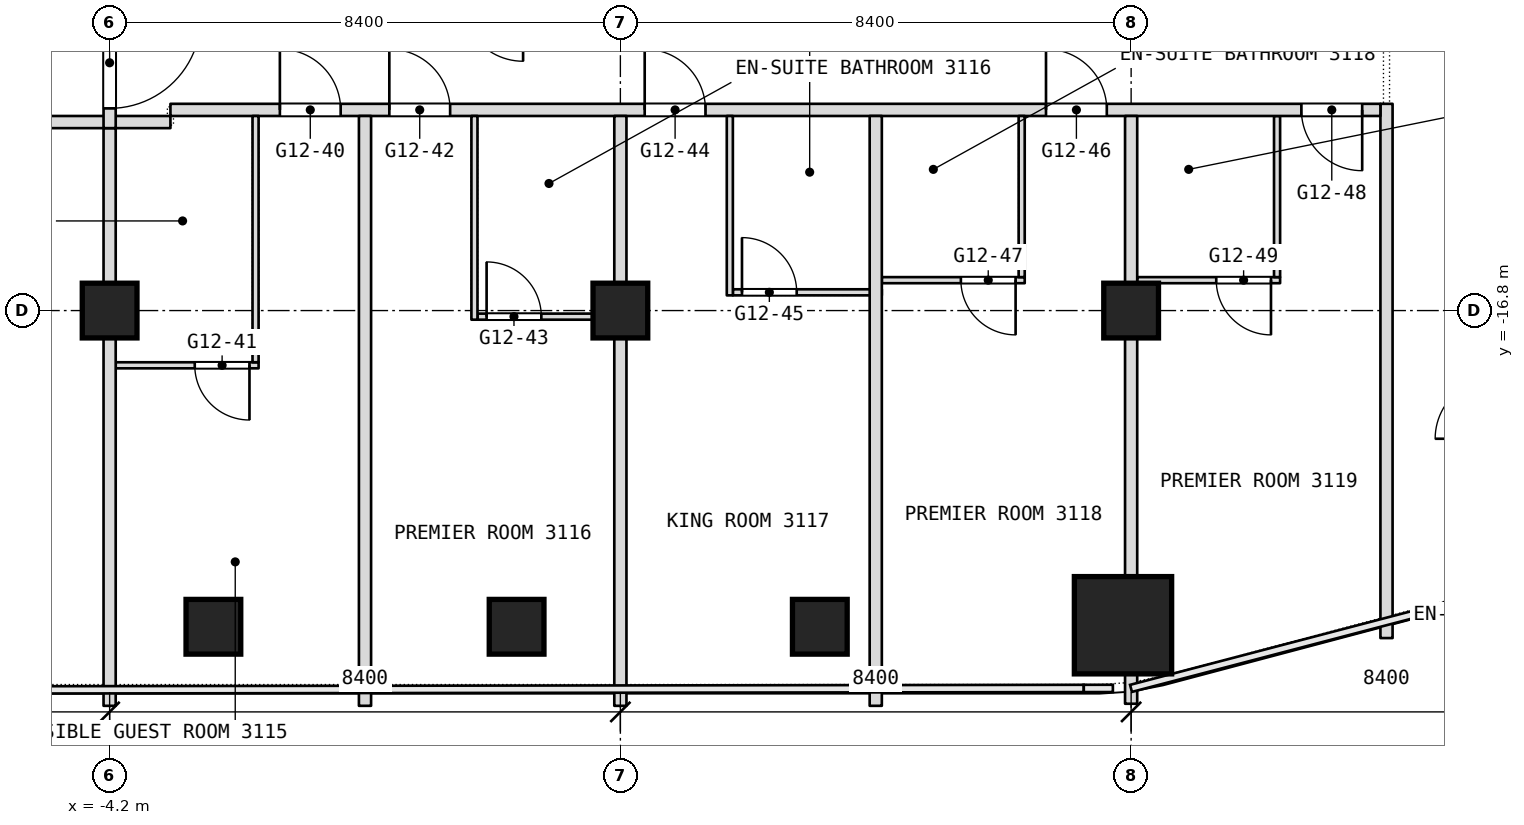
"""IFC4 building model, lengths in metres.
Left out: names, types, materials, properties, quantities, classifications, styles, units other than length and angle.
Written with IfcOpenShell. Run it as: python <this file> out.ifc"""

import sys

from ifc_helpers import new_model, si_unit, direction, frame, frame_2d, origin, origin_2d, place, context, subcontext, project, spatial, rectangle, extrude, element, fill, save


model = new_model("IFC4")
c1 = context("Model", 3, precision=1e-05, world=origin(), true_north=direction((0.0, 1.0)))
c2 = subcontext(c1, "Body", "Model", "MODEL_VIEW")
j1 = project(units=[si_unit("LENGTHUNIT", "METRE"), si_unit("PLANEANGLEUNIT", "RADIAN")], contexts=[c1])
p1 = place(None, origin())
s1 = spatial("IfcSite", under=j1, at=p1, CompositionType="ELEMENT")
p2 = place(p1, origin())
s2 = spatial("IfcBuilding", under=s1, at=p2, CompositionType="ELEMENT")
p3 = place(p2, frame((0.0, 0.0, 137.3)))
s3 = spatial("IfcBuildingStorey", under=s2, at=p3, CompositionType="ELEMENT", Elevation=137.3)
p4 = place(p3, frame((12.466, -21.975, 0.0), z_axis=(0.0, 0.0, 1.0), x_axis=(1.0, 0.0, 0.0)))
e1 = element("IfcColumn", 1, at=p4, inside=s3, PredefinedType="COLUMN", context=c2, shape_type="SweptSolid", body=[
    extrude(rectangle(XDim=1.6, YDim=1.6, at=origin_2d()), origin(), (0.0, 0.0, 1.0), 3.6),
])
for number, where, z_axis, x_axis in (
    (2, (-4.2, -16.8, 0.0), (0.0, 0.0, 1.0), (1.0, 0.0, 0.0)),
    (3, (4.2, -16.8, 0.0), (0.0, 0.0, 1.0), (1.0, 0.0, 0.0)),
    (4, (12.6, -16.8, 0.0), (0.0, 0.0, 1.0), (1.0, 0.0, 0.0)),
    (5, (7.48, -22.0, 0.0), (0.0, 0.0, 1.0), (1.0, 0.0, 0.0)),
    (6, (2.493, -22.0, 0.0), (0.0, 0.0, 1.0), (1.0, 0.0, 0.0)),
    (7, (-2.493, -22.0, 0.0), (0.0, 0.0, 1.0), (1.0, 0.0, 0.0)),
):
    element("IfcColumn", number, at=place(p3, frame(where, z_axis=z_axis, x_axis=x_axis)), inside=s3, PredefinedType="COLUMN", context=c2, shape_type="SweptSolid", body=[
        extrude(rectangle(XDim=0.9, YDim=0.9, at=origin_2d()), origin(), (0.0, 0.0, 1.0), 3.6),
    ])
p5 = place(p3, frame((-4.1, -17.7, 0.0), z_axis=(0.0, 0.0, 1.0), x_axis=(1.0, 0.0, 0.0)))
e8 = element("IfcWall", 8, at=p5, inside=s3, PredefinedType="PARTITIONING", context=c2, shape_type="SweptSolid", body=[
    extrude(rectangle(XDim=2.35, YDim=0.1, at=frame_2d((1.175, 0.0))), origin(), (0.0, 0.0, 1.0), 3.34),
])
p6 = place(p5, frame((1.3, 0.0, 0.0)))
e9 = element("IfcOpeningElement", 9, at=p6, cuts=e8, PredefinedType="OPENING", context=c2, shape_type="SweptSolid", body=[
    extrude(rectangle(XDim=0.9, YDim=2.1, at=frame_2d((0.45, 1.05))), frame((0.0, 0.05, 0.0), z_axis=(0.0, -1.0, 0.0), x_axis=(1.0, 0.0, 0.0)), (0.0, 0.0, 1.0), 0.1),
])
p7 = place(p3, frame((1.85, -16.9, 0.0), z_axis=(0.0, 0.0, 1.0), x_axis=(1.0, 0.0, 0.0)))
e10 = element("IfcWall", 10, at=p7, inside=s3, PredefinedType="PARTITIONING", context=c2, shape_type="SweptSolid", body=[
    extrude(rectangle(XDim=2.45, YDim=0.1, at=frame_2d((1.225, 0.0))), origin(), (0.0, 0.0, 1.0), 2.89),
])
p8 = place(p7, frame((0.15, 0.0, 0.0)))
e11 = element("IfcOpeningElement", 11, at=p8, cuts=e10, PredefinedType="OPENING", context=c2, shape_type="SweptSolid", body=[
    extrude(rectangle(XDim=0.9, YDim=2.1, at=frame_2d((0.45, 1.05))), frame((0.0, 0.05, 0.0), z_axis=(0.0, -1.0, 0.0), x_axis=(1.0, 0.0, 0.0)), (0.0, 0.0, 1.0), 0.1),
])
p9 = place(p3, frame((16.8, -22.186, 0.0), z_axis=(0.0, 0.0, 1.0), x_axis=(0.0, 1.0, 0.0)))
e12 = element("IfcWall", 12, at=p9, inside=s3, PredefinedType="PARTITIONING", context=c2, shape_type="SweptSolid", body=[
    extrude(rectangle(XDim=8.786, YDim=0.2, at=frame_2d((4.393, 0.0))), origin(), (0.0, 0.0, 1.0), 3.34),
])
p10 = place(p3, frame((6.05, -16.5, 0.0), z_axis=(0.0, 0.0, 1.0), x_axis=(1.0, 0.0, 0.0)))
e13 = element("IfcWall", 13, at=p10, inside=s3, PredefinedType="PARTITIONING", context=c2, shape_type="SweptSolid", body=[
    extrude(rectangle(XDim=2.45, YDim=0.1, at=frame_2d((1.225, 0.0))), origin(), (0.0, 0.0, 1.0), 3.34),
])
p11 = place(p10, frame((0.15, 0.0, 0.0)))
e14 = element("IfcOpeningElement", 14, at=p11, cuts=e13, PredefinedType="OPENING", context=c2, shape_type="SweptSolid", body=[
    extrude(rectangle(XDim=0.9, YDim=2.1, at=frame_2d((0.45, 1.05))), frame((0.0, 0.05, 0.0), z_axis=(0.0, -1.0, 0.0), x_axis=(1.0, 0.0, 0.0)), (0.0, 0.0, 1.0), 0.1),
])
p12 = place(p3, frame((8.5, -16.3, 0.0), z_axis=(0.0, 0.0, 1.0), x_axis=(1.0, 0.0, 0.0)))
e15 = element("IfcWall", 15, at=p12, inside=s3, PredefinedType="PARTITIONING", context=c2, shape_type="SweptSolid", body=[
    extrude(rectangle(XDim=2.35, YDim=0.1, at=frame_2d((1.175, 0.0))), origin(), (0.0, 0.0, 1.0), 3.34),
])
p13 = place(p12, frame((1.3, 0.0, 0.0)))
e16 = element("IfcOpeningElement", 16, at=p13, cuts=e15, PredefinedType="OPENING", context=c2, shape_type="SweptSolid", body=[
    extrude(rectangle(XDim=0.9, YDim=2.1, at=frame_2d((0.45, 1.05))), frame((0.0, 0.05, 0.0), z_axis=(0.0, -1.0, 0.0), x_axis=(1.0, 0.0, 0.0)), (0.0, 0.0, 1.0), 0.1),
])
p14 = place(p3, frame((12.7, -16.3, 0.0), z_axis=(0.0, 0.0, 1.0), x_axis=(1.0, 0.0, 0.0)))
e17 = element("IfcWall", 17, at=p14, inside=s3, PredefinedType="PARTITIONING", context=c2, shape_type="SweptSolid", body=[
    extrude(rectangle(XDim=2.35, YDim=0.1, at=frame_2d((1.175, 0.0))), origin(), (0.0, 0.0, 1.0), 3.34),
])
p15 = place(p14, frame((1.3, 0.0, 0.0)))
e18 = element("IfcOpeningElement", 18, at=p15, cuts=e17, PredefinedType="OPENING", context=c2, shape_type="SweptSolid", body=[
    extrude(rectangle(XDim=0.9, YDim=2.1, at=frame_2d((0.45, 1.05))), frame((0.0, 0.05, 0.0), z_axis=(0.0, -1.0, 0.0), x_axis=(1.0, 0.0, 0.0)), (0.0, 0.0, 1.0), 0.1),
])
p16 = place(p3, frame((15.0, -16.25, 0.0), z_axis=(0.0, 0.0, 1.0), x_axis=(0.0, 1.0, 0.0)))
e19 = element("IfcWall", 19, at=p16, inside=s3, PredefinedType="PARTITIONING", context=c2, shape_type="SweptSolid", body=[
    extrude(rectangle(XDim=2.65, YDim=0.1, at=frame_2d((1.325, 0.0))), origin(), (0.0, 0.0, 1.0), 3.34),
])
p17 = place(p3, frame((-12.4, -13.7, 0.0), z_axis=(0.0, 0.0, 1.0), x_axis=(1.0, 0.0, 0.0)))
e20 = element("IfcWall", 20, at=p17, inside=s3, PredefinedType="PARTITIONING", context=c2, shape_type="SweptSolid", body=[
    extrude(rectangle(XDim=9.2, YDim=0.2, at=frame_2d((4.6, 0.0))), origin(), (0.0, 0.0, 1.0), 3.34),
])
p18 = place(p17, frame((3.1, 0.0, 0.0)))
e21 = element("IfcOpeningElement", 21, at=p18, cuts=e20, PredefinedType="OPENING", context=c2, shape_type="SweptSolid", body=[
    extrude(rectangle(XDim=1.8, YDim=2.1, at=frame_2d((0.9, 1.05))), frame((0.0, 0.1, 0.0), z_axis=(0.0, -1.0, 0.0), x_axis=(1.0, 0.0, 0.0)), (0.0, 0.0, 1.0), 0.2),
])
p19 = place(p3, frame((-3.2, -13.5, 0.0), z_axis=(0.0, 0.0, 1.0), x_axis=(1.0, 0.0, 0.0)))
e22 = element("IfcWall", 22, at=p19, inside=s3, PredefinedType="PARTITIONING", context=c2, shape_type="SweptSolid", body=[
    extrude(rectangle(XDim=19.9, YDim=0.2, at=frame_2d((9.95, 0.0))), origin(), (0.0, 0.0, 1.0), 3.34),
])
p20 = place(p19, frame((1.8, 0.0, 0.0)))
e23 = element("IfcOpeningElement", 23, at=p20, cuts=e22, PredefinedType="OPENING", context=c2, shape_type="SweptSolid", body=[
    extrude(rectangle(XDim=1.0, YDim=2.1, at=frame_2d((0.5, 1.05))), frame((0.0, 0.1, 0.0), z_axis=(0.0, -1.0, 0.0), x_axis=(1.0, 0.0, 0.0)), (0.0, 0.0, 1.0), 0.2),
])
p21 = place(p19, frame((3.6, 0.0, 0.0)))
e24 = element("IfcOpeningElement", 24, at=p21, cuts=e22, PredefinedType="OPENING", context=c2, shape_type="SweptSolid", body=[
    extrude(rectangle(XDim=1.0, YDim=2.1, at=frame_2d((0.5, 1.05))), frame((0.0, 0.1, 0.0), z_axis=(0.0, -1.0, 0.0), x_axis=(1.0, 0.0, 0.0)), (0.0, 0.0, 1.0), 0.2),
])
p22 = place(p19, frame((7.8, 0.0, 0.0)))
e25 = element("IfcOpeningElement", 25, at=p22, cuts=e22, PredefinedType="OPENING", context=c2, shape_type="SweptSolid", body=[
    extrude(rectangle(XDim=1.0, YDim=2.1, at=frame_2d((0.5, 1.05))), frame((0.0, 0.1, 0.0), z_axis=(0.0, -1.0, 0.0), x_axis=(1.0, 0.0, 0.0)), (0.0, 0.0, 1.0), 0.2),
])
p23 = place(p19, frame((14.4, 0.0, 0.0)))
e26 = element("IfcOpeningElement", 26, at=p23, cuts=e22, PredefinedType="OPENING", context=c2, shape_type="SweptSolid", body=[
    extrude(rectangle(XDim=1.0, YDim=2.1, at=frame_2d((0.5, 1.05))), frame((0.0, 0.1, 0.0), z_axis=(0.0, -1.0, 0.0), x_axis=(1.0, 0.0, 0.0)), (0.0, 0.0, 1.0), 0.2),
])
p24 = place(p19, frame((18.6, 0.0, 0.0)))
e27 = element("IfcOpeningElement", 27, at=p24, cuts=e22, PredefinedType="OPENING", context=c2, shape_type="SweptSolid", body=[
    extrude(rectangle(XDim=1.0, YDim=2.1, at=frame_2d((0.5, 1.05))), frame((0.0, 0.1, 0.0), z_axis=(0.0, -1.0, 0.0), x_axis=(1.0, 0.0, 0.0)), (0.0, 0.0, 1.0), 0.2),
])
p25 = place(p3, frame((12.6, -23.266, 0.0), z_axis=(0.0, 0.0, 1.0), x_axis=(0.0, 1.0, 0.0)))
e28 = element("IfcWall", 28, at=p25, inside=s3, PredefinedType="PARTITIONING", context=c2, shape_type="SweptSolid", body=[
    extrude(rectangle(XDim=0.491, YDim=0.2, at=frame_2d((0.246, 0.0))), origin(), (0.0, 0.0, 1.0), 3.34),
])
p26 = place(p3, frame((12.6, -21.175, 0.0), z_axis=(0.0, 0.0, 1.0), x_axis=(0.0, 1.0, 0.0)))
e29 = element("IfcWall", 29, at=p26, inside=s3, PredefinedType="PARTITIONING", context=c2, shape_type="SweptSolid", body=[
    extrude(rectangle(XDim=7.575, YDim=0.2, at=frame_2d((3.788, 0.0))), origin(), (0.0, 0.0, 1.0), 3.34),
])
p27 = place(p3, frame((10.8, -16.25, 0.0), z_axis=(0.0, 0.0, 1.0), x_axis=(0.0, 1.0, 0.0)))
e30 = element("IfcWall", 30, at=p27, inside=s3, PredefinedType="PARTITIONING", context=c2, shape_type="SweptSolid", body=[
    extrude(rectangle(XDim=2.65, YDim=0.1, at=frame_2d((1.325, 0.0))), origin(), (0.0, 0.0, 1.0), 3.34),
])
p28 = place(p3, frame((8.4, -23.3, 0.0), z_axis=(0.0, 0.0, 1.0), x_axis=(0.0, 1.0, 0.0)))
e31 = element("IfcWall", 31, at=p28, inside=s3, PredefinedType="PARTITIONING", context=c2, shape_type="SweptSolid", body=[
    extrude(rectangle(XDim=9.7, YDim=0.2, at=frame_2d((4.85, 0.0))), origin(), (0.0, 0.0, 1.0), 3.34),
])
p29 = place(p3, frame((6.0, -16.55, 0.0), z_axis=(0.0, 0.0, 1.0), x_axis=(0.0, 1.0, 0.0)))
e32 = element("IfcWall", 32, at=p29, inside=s3, PredefinedType="PARTITIONING", context=c2, shape_type="SweptSolid", body=[
    extrude(rectangle(XDim=2.95, YDim=0.1, at=frame_2d((1.475, 0.0))), origin(), (0.0, 0.0, 1.0), 3.34),
])
p30 = place(p3, frame((4.2, -23.3, 0.0), z_axis=(0.0, 0.0, 1.0), x_axis=(0.0, 1.0, 0.0)))
e33 = element("IfcWall", 33, at=p30, inside=s3, PredefinedType="PARTITIONING", context=c2, shape_type="SweptSolid", body=[
    extrude(rectangle(XDim=9.7, YDim=0.2, at=frame_2d((4.85, 0.0))), origin(), (0.0, 0.0, 1.0), 3.34),
])
p31 = place(p3, frame((1.8, -16.95, 0.0), z_axis=(0.0, 0.0, 1.0), x_axis=(0.0, 1.0, 0.0)))
e34 = element("IfcWall", 34, at=p31, inside=s3, PredefinedType="PARTITIONING", context=c2, shape_type="SweptSolid", body=[
    extrude(rectangle(XDim=3.35, YDim=0.1, at=frame_2d((1.675, 0.0))), origin(), (0.0, 0.0, 1.0), 3.34),
])
p32 = place(p3, frame((0.0, -23.3, 0.0), z_axis=(0.0, 0.0, 1.0), x_axis=(0.0, 1.0, 0.0)))
e35 = element("IfcWall", 35, at=p32, inside=s3, PredefinedType="PARTITIONING", context=c2, shape_type="SweptSolid", body=[
    extrude(rectangle(XDim=9.7, YDim=0.2, at=frame_2d((4.85, 0.0))), origin(), (0.0, 0.0, 1.0), 3.34),
])
p33 = place(p3, frame((-1.8, -17.65, 0.0), z_axis=(0.0, 0.0, 1.0), x_axis=(0.0, 1.0, 0.0)))
e36 = element("IfcWall", 36, at=p33, inside=s3, PredefinedType="PARTITIONING", context=c2, shape_type="SweptSolid", body=[
    extrude(rectangle(XDim=4.05, YDim=0.1, at=frame_2d((2.025, 0.0))), origin(), (0.0, 0.0, 1.0), 3.34),
])
p34 = place(p3, frame((-4.2, -23.3, 0.0), z_axis=(0.0, 0.0, 1.0), x_axis=(0.0, 1.0, 0.0)))
e37 = element("IfcWall", 37, at=p34, inside=s3, PredefinedType="PARTITIONING", context=c2, shape_type="SweptSolid", body=[
    extrude(rectangle(XDim=9.5, YDim=0.2, at=frame_2d((4.75, 0.0))), origin(), (0.0, 0.0, 1.0), 3.34),
])
p35 = place(p3, frame((-4.2, -13.8, 0.0), z_axis=(0.0, 0.0, 1.0), x_axis=(0.0, 1.0, 0.0)))
e38 = element("IfcWall", 38, at=p35, inside=s3, PredefinedType="PARTITIONING", context=c2, shape_type="SweptSolid", body=[
    extrude(rectangle(XDim=13.8, YDim=0.2, at=frame_2d((6.9, 0.0))), origin(), (0.0, 0.0, 1.0), 3.34),
])
p36 = place(p35, frame((12.15, 0.0, 0.0)))
e39 = element("IfcOpeningElement", 39, at=p36, cuts=e38, PredefinedType="OPENING", context=c2, shape_type="SweptSolid", body=[
    extrude(rectangle(XDim=1.5, YDim=2.1, at=frame_2d((0.75, 1.05))), frame((0.0, 0.1, 0.0), z_axis=(0.0, -1.0, 0.0), x_axis=(1.0, 0.0, 0.0)), (0.0, 0.0, 1.0), 0.2),
])
p37 = place(p35, frame((0.325, 0.0, 0.0)))
e40 = element("IfcOpeningElement", 40, at=p37, cuts=e38, PredefinedType="OPENING", context=c2, shape_type="SweptSolid", body=[
    extrude(rectangle(XDim=1.5, YDim=2.1, at=frame_2d((0.75, 1.05))), frame((0.0, 0.1, 0.0), z_axis=(0.0, -1.0, 0.0), x_axis=(1.0, 0.0, 0.0)), (0.0, 0.0, 1.0), 0.2),
])
p38 = place(p6, origin())
e41 = element("IfcDoor", 41, at=p38, inside=s3, OperationType="SINGLE_SWING_RIGHT", PredefinedType="DOOR", context=c2, shape_type="SweptSolid", body=[
    extrude(rectangle(XDim=0.9, YDim=2.1, at=frame_2d((0.45, 1.05))), frame((0.0, 0.025, 0.0), z_axis=(0.0, -1.0, 0.0), x_axis=(1.0, 0.0, 0.0)), (0.0, 0.0, 1.0), 0.05),
])
fill(e9, e41)
p39 = place(p8, origin())
e42 = element("IfcDoor", 42, at=p39, inside=s3, OperationType="SINGLE_SWING_LEFT", PredefinedType="DOOR", context=c2, shape_type="SweptSolid", body=[
    extrude(rectangle(XDim=0.9, YDim=2.1, at=frame_2d((0.45, 1.05))), frame((0.0, 0.025, 0.0), z_axis=(0.0, -1.0, 0.0), x_axis=(1.0, 0.0, 0.0)), (0.0, 0.0, 1.0), 0.05),
])
fill(e11, e42)
p40 = place(p11, origin())
e43 = element("IfcDoor", 43, at=p40, inside=s3, OperationType="SINGLE_SWING_LEFT", PredefinedType="DOOR", context=c2, shape_type="SweptSolid", body=[
    extrude(rectangle(XDim=0.9, YDim=2.1, at=frame_2d((0.45, 1.05))), frame((0.0, 0.025, 0.0), z_axis=(0.0, -1.0, 0.0), x_axis=(1.0, 0.0, 0.0)), (0.0, 0.0, 1.0), 0.05),
])
fill(e14, e43)
p41 = place(p13, origin())
e44 = element("IfcDoor", 44, at=p41, inside=s3, OperationType="SINGLE_SWING_RIGHT", PredefinedType="DOOR", context=c2, shape_type="SweptSolid", body=[
    extrude(rectangle(XDim=0.9, YDim=2.1, at=frame_2d((0.45, 1.05))), frame((0.0, 0.025, 0.0), z_axis=(0.0, -1.0, 0.0), x_axis=(1.0, 0.0, 0.0)), (0.0, 0.0, 1.0), 0.05),
])
fill(e16, e44)
p42 = place(p15, origin())
e45 = element("IfcDoor", 45, at=p42, inside=s3, OperationType="SINGLE_SWING_RIGHT", PredefinedType="DOOR", context=c2, shape_type="SweptSolid", body=[
    extrude(rectangle(XDim=0.9, YDim=2.1, at=frame_2d((0.45, 1.05))), frame((0.0, 0.025, 0.0), z_axis=(0.0, -1.0, 0.0), x_axis=(1.0, 0.0, 0.0)), (0.0, 0.0, 1.0), 0.05),
])
fill(e18, e45)
p43 = place(p20, origin())
e46 = element("IfcDoor", 46, at=p43, inside=s3, OperationType="SINGLE_SWING_RIGHT", PredefinedType="DOOR", context=c2, shape_type="SweptSolid", body=[
    extrude(rectangle(XDim=1.0, YDim=2.1, at=frame_2d((0.5, 1.05))), frame((0.0, 0.025, 0.0), z_axis=(0.0, -1.0, 0.0), x_axis=(1.0, 0.0, 0.0)), (0.0, 0.0, 1.0), 0.05),
])
fill(e23, e46)
p44 = place(p21, origin())
e47 = element("IfcDoor", 47, at=p44, inside=s3, OperationType="SINGLE_SWING_RIGHT", PredefinedType="DOOR", context=c2, shape_type="SweptSolid", body=[
    extrude(rectangle(XDim=1.0, YDim=2.1, at=frame_2d((0.5, 1.05))), frame((0.0, 0.025, 0.0), z_axis=(0.0, -1.0, 0.0), x_axis=(1.0, 0.0, 0.0)), (0.0, 0.0, 1.0), 0.05),
])
fill(e24, e47)
p45 = place(p22, origin())
e48 = element("IfcDoor", 48, at=p45, inside=s3, OperationType="SINGLE_SWING_RIGHT", PredefinedType="DOOR", context=c2, shape_type="SweptSolid", body=[
    extrude(rectangle(XDim=1.0, YDim=2.1, at=frame_2d((0.5, 1.05))), frame((0.0, 0.025, 0.0), z_axis=(0.0, -1.0, 0.0), x_axis=(1.0, 0.0, 0.0)), (0.0, 0.0, 1.0), 0.05),
])
fill(e25, e48)
p46 = place(p23, origin())
e49 = element("IfcDoor", 49, at=p46, inside=s3, OperationType="SINGLE_SWING_RIGHT", PredefinedType="DOOR", context=c2, shape_type="SweptSolid", body=[
    extrude(rectangle(XDim=1.0, YDim=2.1, at=frame_2d((0.5, 1.05))), frame((0.0, 0.025, 0.0), z_axis=(0.0, -1.0, 0.0), x_axis=(1.0, 0.0, 0.0)), (0.0, 0.0, 1.0), 0.05),
])
fill(e26, e49)
p47 = place(p24, origin())
e50 = element("IfcDoor", 50, at=p47, inside=s3, OperationType="SINGLE_SWING_LEFT", PredefinedType="DOOR", context=c2, shape_type="SweptSolid", body=[
    extrude(rectangle(XDim=1.0, YDim=2.1, at=frame_2d((0.5, 1.05))), frame((0.0, 0.025, 0.0), z_axis=(0.0, -1.0, 0.0), x_axis=(1.0, 0.0, 0.0)), (0.0, 0.0, 1.0), 0.05),
])
fill(e27, e50)
p48 = place(p37, origin())
e51 = element("IfcDoor", 51, at=p48, inside=s3, OperationType="DOUBLE_DOOR_DOUBLE_SWING", PredefinedType="DOOR", context=c2, shape_type="SweptSolid", body=[
    extrude(rectangle(XDim=1.5, YDim=2.1, at=frame_2d((0.75, 1.05))), frame((0.0, 0.025, 0.0), z_axis=(0.0, -1.0, 0.0), x_axis=(1.0, 0.0, 0.0)), (0.0, 0.0, 1.0), 0.05),
])
fill(e40, e51)
save(model, sys.argv[1])
